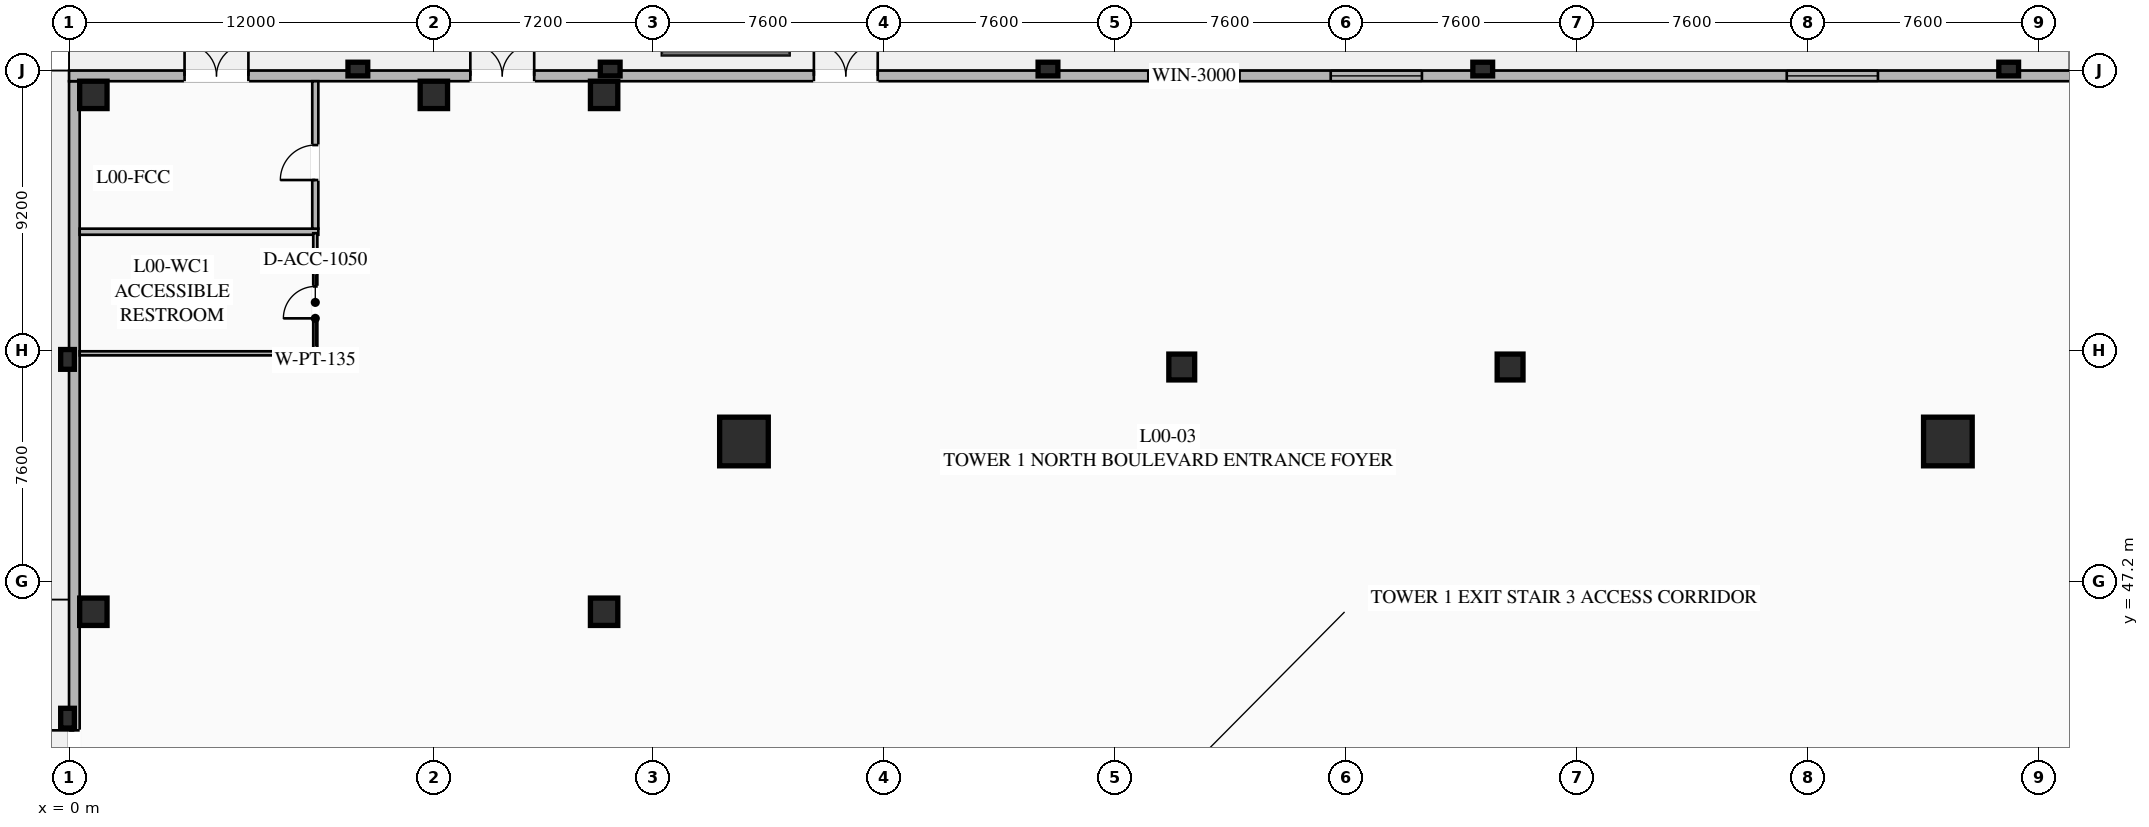
"""IFC4 building model, lengths in metres.
Left out: names, types, materials, properties, quantities, classifications, styles, units other than length and angle.
Written with IfcOpenShell. Run it as: python <this file> out.ifc"""

import sys

from ifc_helpers import new_model, si_unit, direction, frame, frame_2d, origin, origin_2d, place, context, subcontext, project, spatial, rectangle, hollow_rectangle, extrude, element, fill, save


model = new_model("IFC4")
c1 = context("Model", 3, precision=1e-05, world=origin(), true_north=direction((0.0, 1.0)))
c2 = subcontext(c1, "Body", "Model", "MODEL_VIEW")
j1 = project(units=[si_unit("LENGTHUNIT", "METRE"), si_unit("PLANEANGLEUNIT", "RADIAN")], contexts=[c1])
p1 = place(None, origin())
s1 = spatial("IfcSite", under=j1, at=p1, CompositionType="ELEMENT")
p2 = place(p1, origin())
s2 = spatial("IfcBuilding", under=s1, at=p2, CompositionType="ELEMENT")
p3 = place(p2, origin())
s3 = spatial("IfcBuildingStorey", under=s2, at=p3, CompositionType="ELEMENT", Elevation=0.0)
for number, where, z_axis, x_axis in (
    (1, (61.8, 51.8, 0.0), (0.0, 0.0, 1.0), (1.0, 0.0, 0.0)),
    (2, (22.2, 51.8, 0.0), (0.0, 0.0, 1.0), (1.0, 0.0, 0.0)),
):
    element("IfcColumn", number, at=place(p3, frame(where, z_axis=z_axis, x_axis=x_axis)), inside=s3, PredefinedType="COLUMN", context=c2, shape_type="SweptSolid", body=[
        extrude(hollow_rectangle(XDim=1.6, YDim=1.6, WallThickness=0.06, at=origin_2d()), origin(), (0.0, 0.0, 1.0), 5.14),
    ])
for number, where, z_axis, x_axis in (
    (3, (47.4, 54.25, 0.0), (0.0, 0.0, 1.0), (1.0, 0.0, 0.0)),
    (4, (36.6, 54.25, 0.0), (0.0, 0.0, 1.0), (1.0, 0.0, 0.0)),
):
    element("IfcColumn", number, at=place(p3, frame(where, z_axis=z_axis, x_axis=x_axis)), inside=s3, PredefinedType="COLUMN", context=c2, shape_type="SweptSolid", body=[
        extrude(hollow_rectangle(XDim=0.85, YDim=0.85, WallThickness=0.035, at=origin_2d()), origin(), (0.0, 0.0, 1.0), 5.14),
    ])
for number, where, z_axis, x_axis in (
    (5, (0.8, 63.2, 0.0), (0.0, 0.0, 1.0), (1.0, 0.0, 0.0)),
    (6, (12.0, 63.2, 0.0), (0.0, 0.0, 1.0), (1.0, 0.0, 0.0)),
    (7, (17.6, 63.2, 0.0), (0.0, 0.0, 1.0), (1.0, 0.0, 0.0)),
    (8, (0.8, 46.2, 0.0), (0.0, 0.0, 1.0), (1.0, 0.0, 0.0)),
    (9, (17.6, 46.2, 0.0), (0.0, 0.0, 1.0), (1.0, 0.0, 0.0)),
):
    element("IfcColumn", number, at=place(p3, frame(where, z_axis=z_axis, x_axis=x_axis)), inside=s3, PredefinedType="COLUMN", context=c2, shape_type="SweptSolid", body=[
        extrude(rectangle(XDim=0.9, YDim=0.9, at=origin_2d()), origin(), (0.0, 0.0, 1.0), 5.14),
    ])
p4 = place(p3, frame((0.175, 0.35, 0.0), z_axis=(0.0, 0.0, 1.0), x_axis=(0.0, 1.0, 0.0)))
e10 = element("IfcWall", 10, at=p4, inside=s3, PredefinedType="SOLIDWALL", context=c2, shape_type="SweptSolid", body=[
    extrude(rectangle(XDim=63.3, YDim=0.35, at=frame_2d((31.65, 0.0))), origin(), (0.0, 0.0, 1.0), 5.14),
])
p5 = place(p4, frame((16.15, 0.0, 0.0)))
e11 = element("IfcOpeningElement", 11, at=p5, cuts=e10, PredefinedType="OPENING", context=c2, shape_type="SweptSolid", body=[
    extrude(rectangle(XDim=2.1, YDim=2.5, at=frame_2d((1.05, 1.25))), frame((0.0, 0.185, 0.0), z_axis=(0.0, -1.0, 0.0), x_axis=(1.0, 0.0, 0.0)), (0.0, 0.0, 1.0), 0.37),
])
p6 = place(p4, frame((25.15, 0.0, 0.0)))
e12 = element("IfcOpeningElement", 12, at=p6, cuts=e10, PredefinedType="OPENING", context=c2, shape_type="SweptSolid", body=[
    extrude(rectangle(XDim=2.1, YDim=2.5, at=frame_2d((1.05, 1.25))), frame((0.0, 0.185, 0.0), z_axis=(0.0, -1.0, 0.0), x_axis=(1.0, 0.0, 0.0)), (0.0, 0.0, 1.0), 0.37),
])
p7 = place(p4, frame((34.15, 0.0, 0.0)))
e13 = element("IfcOpeningElement", 13, at=p7, cuts=e10, PredefinedType="OPENING", context=c2, shape_type="SweptSolid", body=[
    extrude(rectangle(XDim=2.1, YDim=2.5, at=frame_2d((1.05, 1.25))), frame((0.0, 0.185, 0.0), z_axis=(0.0, -1.0, 0.0), x_axis=(1.0, 0.0, 0.0)), (0.0, 0.0, 1.0), 0.37),
])
p8 = place(p4, frame((39.85, 0.0, 0.0)))
e14 = element("IfcOpeningElement", 14, at=p8, cuts=e10, PredefinedType="OPENING", context=c2, shape_type="SweptSolid", body=[
    extrude(rectangle(XDim=2.1, YDim=2.5, at=frame_2d((1.05, 1.25))), frame((0.0, 0.185, 0.0), z_axis=(0.0, -1.0, 0.0), x_axis=(1.0, 0.0, 0.0)), (0.0, 0.0, 1.0), 0.37),
])
p9 = place(p3, frame((0.0, 63.825, 0.0), z_axis=(0.0, 0.0, 1.0), x_axis=(1.0, 0.0, 0.0)))
e15 = element("IfcWall", 15, at=p9, inside=s3, PredefinedType="SOLIDWALL", context=c2, shape_type="SweptSolid", body=[
    extrude(rectangle(XDim=144.0, YDim=0.35, at=frame_2d((72.0, 0.0))), origin(), (0.0, 0.0, 1.0), 5.14),
])
p10 = place(p9, frame((68.2, 0.0, 0.0)))
e16 = element("IfcOpeningElement", 16, at=p10, cuts=e15, PredefinedType="OPENING", context=c2, shape_type="SweptSolid", body=[
    extrude(rectangle(XDim=2.6, YDim=2.75, at=frame_2d((1.3, 1.375))), frame((0.0, 0.185, 0.0), z_axis=(0.0, -1.0, 0.0), x_axis=(1.0, 0.0, 0.0)), (0.0, 0.0, 1.0), 0.37),
])
p11 = place(p9, frame((82.8, 0.0, 0.0)))
e17 = element("IfcOpeningElement", 17, at=p11, cuts=e15, PredefinedType="OPENING", context=c2, shape_type="SweptSolid", body=[
    extrude(rectangle(XDim=2.6, YDim=2.75, at=frame_2d((1.3, 1.375))), frame((0.0, 0.185, 0.0), z_axis=(0.0, -1.0, 0.0), x_axis=(1.0, 0.0, 0.0)), (0.0, 0.0, 1.0), 0.37),
])
p12 = place(p9, frame((3.8, 0.0, 0.0)))
e18 = element("IfcOpeningElement", 18, at=p12, cuts=e15, PredefinedType="OPENING", context=c2, shape_type="SweptSolid", body=[
    extrude(rectangle(XDim=2.1, YDim=2.5, at=frame_2d((1.05, 1.25))), frame((0.0, 0.185, 0.0), z_axis=(0.0, -1.0, 0.0), x_axis=(1.0, 0.0, 0.0)), (0.0, 0.0, 1.0), 0.37),
])
p13 = place(p9, frame((13.2, 0.0, 0.0)))
e19 = element("IfcOpeningElement", 19, at=p13, cuts=e15, PredefinedType="OPENING", context=c2, shape_type="SweptSolid", body=[
    extrude(rectangle(XDim=2.1, YDim=2.5, at=frame_2d((1.05, 1.25))), frame((0.0, 0.185, 0.0), z_axis=(0.0, -1.0, 0.0), x_axis=(1.0, 0.0, 0.0)), (0.0, 0.0, 1.0), 0.37),
])
p14 = place(p9, frame((24.5, 0.0, 0.0)))
e20 = element("IfcOpeningElement", 20, at=p14, cuts=e15, PredefinedType="OPENING", context=c2, shape_type="SweptSolid", body=[
    extrude(rectangle(XDim=2.1, YDim=2.5, at=frame_2d((1.05, 1.25))), frame((0.0, 0.185, 0.0), z_axis=(0.0, -1.0, 0.0), x_axis=(1.0, 0.0, 0.0)), (0.0, 0.0, 1.0), 0.37),
])
p15 = place(p9, frame((73.2, 0.0, 0.0)))
e21 = element("IfcOpeningElement", 21, at=p15, cuts=e15, PredefinedType="OPENING", context=c2, shape_type="SweptSolid", body=[
    extrude(rectangle(XDim=2.4, YDim=2.7, at=frame_2d((1.2, 1.35))), frame((0.0, 0.185, 0.0), z_axis=(0.0, -1.0, 0.0), x_axis=(1.0, 0.0, 0.0)), (0.0, 0.0, 1.0), 0.37),
])
p16 = place(p9, frame((78.2, 0.0, 0.0)))
e22 = element("IfcOpeningElement", 22, at=p16, cuts=e15, PredefinedType="OPENING", context=c2, shape_type="SweptSolid", body=[
    extrude(rectangle(XDim=2.1, YDim=2.5, at=frame_2d((1.05, 1.25))), frame((0.0, 0.185, 0.0), z_axis=(0.0, -1.0, 0.0), x_axis=(1.0, 0.0, 0.0)), (0.0, 0.0, 1.0), 0.37),
])
p17 = place(p9, frame((93.5, 0.0, 0.0)))
e23 = element("IfcOpeningElement", 23, at=p17, cuts=e15, PredefinedType="OPENING", context=c2, shape_type="SweptSolid", body=[
    extrude(rectangle(XDim=2.1, YDim=2.5, at=frame_2d((1.05, 1.25))), frame((0.0, 0.185, 0.0), z_axis=(0.0, -1.0, 0.0), x_axis=(1.0, 0.0, 0.0)), (0.0, 0.0, 1.0), 0.37),
])
p18 = place(p9, frame((35.5, 0.0, 0.95)))
e24 = element("IfcOpeningElement", 24, at=p18, cuts=e15, PredefinedType="OPENING", context=c2, shape_type="SweptSolid", body=[
    extrude(rectangle(XDim=3.0, YDim=2.4, at=frame_2d((1.5, 1.2))), frame((0.0, 0.185, 0.0), z_axis=(0.0, -1.0, 0.0), x_axis=(1.0, 0.0, 0.0)), (0.0, 0.0, 1.0), 0.37),
])
p19 = place(p9, frame((41.5, 0.0, 0.95)))
e25 = element("IfcOpeningElement", 25, at=p19, cuts=e15, PredefinedType="OPENING", context=c2, shape_type="SweptSolid", body=[
    extrude(rectangle(XDim=3.0, YDim=2.4, at=frame_2d((1.5, 1.2))), frame((0.0, 0.185, 0.0), z_axis=(0.0, -1.0, 0.0), x_axis=(1.0, 0.0, 0.0)), (0.0, 0.0, 1.0), 0.37),
])
p20 = place(p9, frame((56.5, 0.0, 0.95)))
e26 = element("IfcOpeningElement", 26, at=p20, cuts=e15, PredefinedType="OPENING", context=c2, shape_type="SweptSolid", body=[
    extrude(rectangle(XDim=3.0, YDim=2.4, at=frame_2d((1.5, 1.2))), frame((0.0, 0.185, 0.0), z_axis=(0.0, -1.0, 0.0), x_axis=(1.0, 0.0, 0.0)), (0.0, 0.0, 1.0), 0.37),
])
p21 = place(p9, frame((110.5, 0.0, 0.95)))
e27 = element("IfcOpeningElement", 27, at=p21, cuts=e15, PredefinedType="OPENING", context=c2, shape_type="SweptSolid", body=[
    extrude(rectangle(XDim=3.0, YDim=2.4, at=frame_2d((1.5, 1.2))), frame((0.0, 0.185, 0.0), z_axis=(0.0, -1.0, 0.0), x_axis=(1.0, 0.0, 0.0)), (0.0, 0.0, 1.0), 0.37),
])
p22 = place(p9, frame((126.5, 0.0, 0.95)))
e28 = element("IfcOpeningElement", 28, at=p22, cuts=e15, PredefinedType="OPENING", context=c2, shape_type="SweptSolid", body=[
    extrude(rectangle(XDim=3.0, YDim=2.4, at=frame_2d((1.5, 1.2))), frame((0.0, 0.185, 0.0), z_axis=(0.0, -1.0, 0.0), x_axis=(1.0, 0.0, 0.0)), (0.0, 0.0, 1.0), 0.37),
])
for number, where, z_axis, x_axis in (
    (29, (9.5, 64.05, 0.0), (0.0, 0.0, 1.0), (1.0, 0.0, 0.0)),
    (30, (17.8, 64.05, 0.0), (0.0, 0.0, 1.0), (1.0, 0.0, 0.0)),
    (31, (32.2, 64.05, 0.0), (0.0, 0.0, 1.0), (1.0, 0.0, 0.0)),
    (32, (46.5, 64.05, 0.0), (0.0, 0.0, 1.0), (1.0, 0.0, 0.0)),
    (33, (63.8, 64.05, 0.0), (0.0, 0.0, 1.0), (1.0, 0.0, 0.0)),
    (34, (-0.05, 42.7, 0.0), (0.0, 0.0, 1.0), (0.0, 1.0, 0.0)),
    (35, (-0.05, 54.5, 0.0), (0.0, 0.0, 1.0), (0.0, 1.0, 0.0)),
):
    element("IfcColumn", number, at=place(p3, frame(where, z_axis=z_axis, x_axis=x_axis)), inside=s3, PredefinedType="PILASTER", context=c2, shape_type="SweptSolid", body=[
        extrude(rectangle(XDim=0.65, YDim=0.45, at=origin_2d()), origin(), (0.0, 0.0, 1.0), 5.14),
    ])
p23 = place(p3, frame((0.35, 58.7, 0.0), z_axis=(0.0, 0.0, 1.0), x_axis=(1.0, 0.0, 0.0)))
e36 = element("IfcWall", 36, at=p23, inside=s3, PredefinedType="SOLIDWALL", context=c2, shape_type="SweptSolid", body=[
    extrude(rectangle(XDim=7.85, YDim=0.2, at=frame_2d((3.925, 0.0))), origin(), (0.0, 0.0, 1.0), 3.31),
])
p24 = place(p3, frame((8.1, 58.8, 0.0), z_axis=(0.0, 0.0, 1.0), x_axis=(0.0, 1.0, 0.0)))
e37 = element("IfcWall", 37, at=p24, inside=s3, PredefinedType="SOLIDWALL", context=c2, shape_type="SweptSolid", body=[
    extrude(rectangle(XDim=4.85, YDim=0.2, at=frame_2d((2.425, 0.0))), origin(), (0.0, 0.0, 1.0), 3.31),
])
p25 = place(p24, frame((1.6, 0.0, 0.0)))
e38 = element("IfcOpeningElement", 38, at=p25, cuts=e37, PredefinedType="OPENING", context=c2, shape_type="SweptSolid", body=[
    extrude(rectangle(XDim=1.15, YDim=2.2, at=frame_2d((0.575, 1.1))), frame((0.0, 0.11, 0.0), z_axis=(0.0, -1.0, 0.0), x_axis=(1.0, 0.0, 0.0)), (0.0, 0.0, 1.0), 0.22),
])
p26 = place(p3, frame((8.1, 54.65, 0.0), z_axis=(0.0, 0.0, 1.0), x_axis=(0.0, 1.0, 0.0)))
e39 = element("IfcWall", 39, at=p26, inside=s3, PredefinedType="PARTITIONING", context=c2, shape_type="SweptSolid", body=[
    extrude(rectangle(XDim=4.0, YDim=0.135, at=frame_2d((2.0, 0.0))), origin(), (0.0, 0.0, 1.0), 3.31),
])
p27 = place(p26, frame((1.2, 0.0, 0.0)))
e40 = element("IfcOpeningElement", 40, at=p27, cuts=e39, PredefinedType="OPENING", context=c2, shape_type="SweptSolid", body=[
    extrude(rectangle(XDim=1.05, YDim=2.2, at=frame_2d((0.525, 1.1))), frame((0.0, 0.077, 0.0), z_axis=(0.0, -1.0, 0.0), x_axis=(1.0, 0.0, 0.0)), (0.0, 0.0, 1.0), 0.155),
])
p28 = place(p3, frame((0.35, 54.7, 0.0), z_axis=(0.0, 0.0, 1.0), x_axis=(1.0, 0.0, 0.0)))
e41 = element("IfcWall", 41, at=p28, inside=s3, PredefinedType="PARTITIONING", context=c2, shape_type="SweptSolid", body=[
    extrude(rectangle(XDim=7.8, YDim=0.135, at=frame_2d((3.9, 0.0))), origin(), (0.0, 0.0, 1.0), 3.31),
])
p29 = place(p12, origin())
e42 = element("IfcDoor", 42, at=p29, inside=s3, OperationType="DOUBLE_DOOR_SINGLE_SWING", PredefinedType="DOOR", context=c2, shape_type="SweptSolid", body=[
    extrude(rectangle(XDim=2.1, YDim=2.5, at=frame_2d((1.05, 1.25))), frame((0.0, 0.025, 0.0), z_axis=(0.0, -1.0, 0.0), x_axis=(1.0, 0.0, 0.0)), (0.0, 0.0, 1.0), 0.05),
])
fill(e18, e42)
p30 = place(p13, origin())
e43 = element("IfcDoor", 43, at=p30, inside=s3, OperationType="DOUBLE_DOOR_SINGLE_SWING", PredefinedType="DOOR", context=c2, shape_type="SweptSolid", body=[
    extrude(rectangle(XDim=2.1, YDim=2.5, at=frame_2d((1.05, 1.25))), frame((0.0, 0.025, 0.0), z_axis=(0.0, -1.0, 0.0), x_axis=(1.0, 0.0, 0.0)), (0.0, 0.0, 1.0), 0.05),
])
fill(e19, e43)
p31 = place(p14, origin())
e44 = element("IfcDoor", 44, at=p31, inside=s3, OperationType="DOUBLE_DOOR_SINGLE_SWING", PredefinedType="DOOR", context=c2, shape_type="SweptSolid", body=[
    extrude(rectangle(XDim=2.1, YDim=2.5, at=frame_2d((1.05, 1.25))), frame((0.0, 0.025, 0.0), z_axis=(0.0, -1.0, 0.0), x_axis=(1.0, 0.0, 0.0)), (0.0, 0.0, 1.0), 0.05),
])
fill(e20, e44)
p32 = place(p8, origin())
e45 = element("IfcDoor", 45, at=p32, inside=s3, OperationType="DOUBLE_DOOR_SINGLE_SWING", PredefinedType="DOOR", context=c2, shape_type="SweptSolid", body=[
    extrude(rectangle(XDim=2.1, YDim=2.5, at=frame_2d((1.05, 1.25))), frame((0.0, 0.025, 0.0), z_axis=(0.0, -1.0, 0.0), x_axis=(1.0, 0.0, 0.0)), (0.0, 0.0, 1.0), 0.05),
])
fill(e14, e45)
p33 = place(p18, origin())
e46 = element("IfcWindow", 46, at=p33, inside=s3, PartitioningType="SINGLE_PANEL", PredefinedType="WINDOW", context=c2, shape_type="SweptSolid", body=[
    extrude(rectangle(XDim=3.0, YDim=2.4, at=frame_2d((1.5, 1.2))), frame((0.0, 0.03, 0.0), z_axis=(0.0, -1.0, 0.0), x_axis=(1.0, 0.0, 0.0)), (0.0, 0.0, 1.0), 0.06),
])
fill(e24, e46)
p34 = place(p19, origin())
e47 = element("IfcWindow", 47, at=p34, inside=s3, PartitioningType="SINGLE_PANEL", PredefinedType="WINDOW", context=c2, shape_type="SweptSolid", body=[
    extrude(rectangle(XDim=3.0, YDim=2.4, at=frame_2d((1.5, 1.2))), frame((0.0, 0.03, 0.0), z_axis=(0.0, -1.0, 0.0), x_axis=(1.0, 0.0, 0.0)), (0.0, 0.0, 1.0), 0.06),
])
fill(e25, e47)
p35 = place(p20, origin())
e48 = element("IfcWindow", 48, at=p35, inside=s3, PartitioningType="SINGLE_PANEL", PredefinedType="WINDOW", context=c2, shape_type="SweptSolid", body=[
    extrude(rectangle(XDim=3.0, YDim=2.4, at=frame_2d((1.5, 1.2))), frame((0.0, 0.03, 0.0), z_axis=(0.0, -1.0, 0.0), x_axis=(1.0, 0.0, 0.0)), (0.0, 0.0, 1.0), 0.06),
])
fill(e26, e48)
p36 = place(p25, origin())
e49 = element("IfcDoor", 49, at=p36, inside=s3, OperationType="SINGLE_SWING_LEFT", PredefinedType="DOOR", context=c2, shape_type="SweptSolid", body=[
    extrude(rectangle(XDim=1.15, YDim=2.2, at=frame_2d((0.575, 1.1))), frame((0.0, 0.025, 0.0), z_axis=(0.0, -1.0, 0.0), x_axis=(1.0, 0.0, 0.0)), (0.0, 0.0, 1.0), 0.05),
])
fill(e38, e49)
p37 = place(p27, origin())
e50 = element("IfcDoor", 50, at=p37, inside=s3, OperationType="SINGLE_SWING_LEFT", PredefinedType="DOOR", context=c2, shape_type="SweptSolid", body=[
    extrude(rectangle(XDim=1.05, YDim=2.2, at=frame_2d((0.525, 1.1))), frame((0.0, 0.025, 0.0), z_axis=(0.0, -1.0, 0.0), x_axis=(1.0, 0.0, 0.0)), (0.0, 0.0, 1.0), 0.05),
])
fill(e40, e50)
save(model, sys.argv[1])
